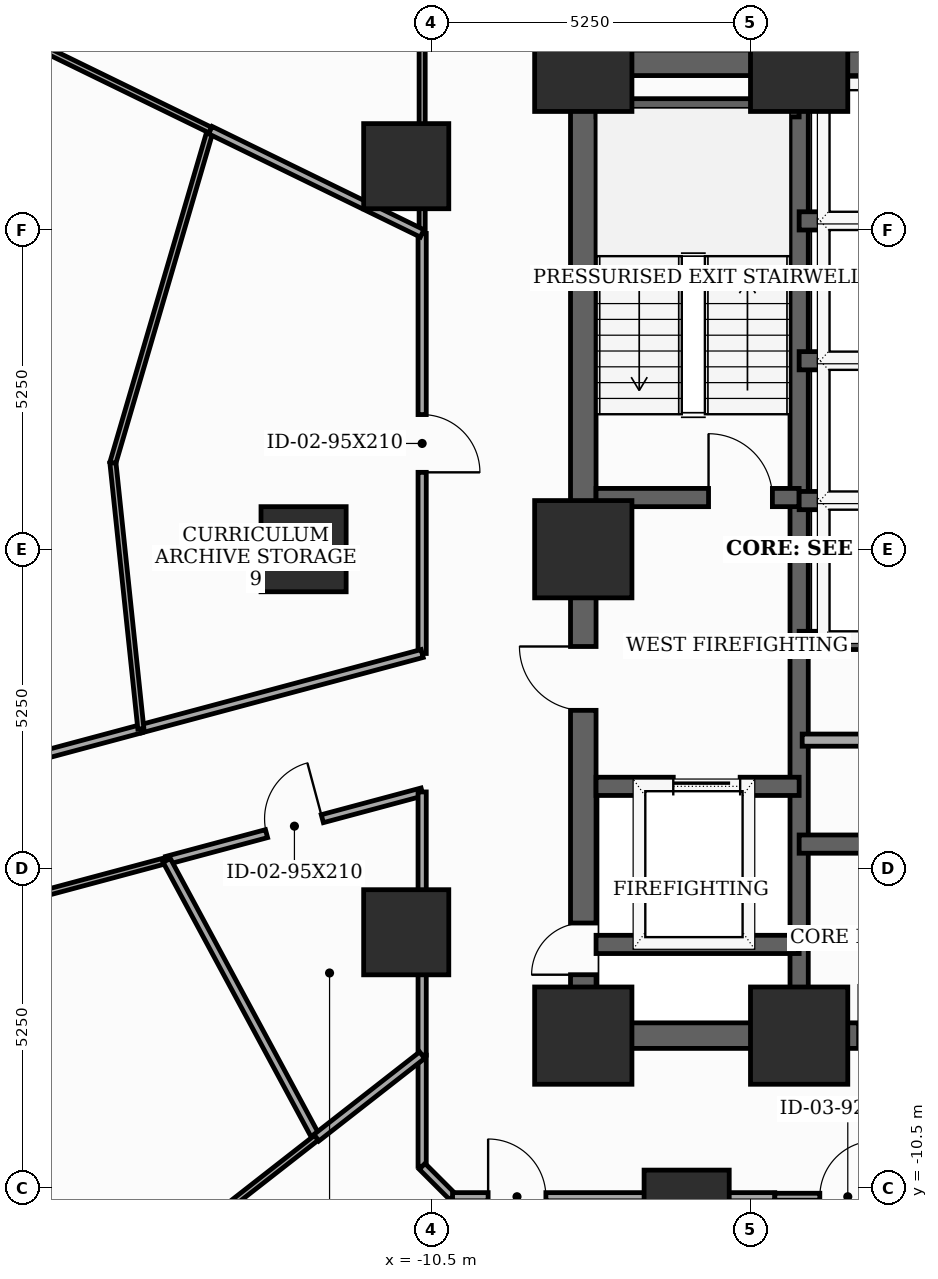
"""IFC4 building model, lengths in metres.
Left out: names, types, materials, properties, quantities, classifications, styles, units other than length and angle.
Written with IfcOpenShell. Run it as: python <this file> out.ifc"""

import sys

from ifc_helpers import new_model, si_unit, direction, frame, frame_2d, origin, origin_2d, place, context, subcontext, project, spatial, rectangle, extrude, element, fill, save


model = new_model("IFC4")
c1 = context("Model", 3, precision=1e-05, world=origin(), true_north=direction((0.0, 1.0)))
c2 = subcontext(c1, "Body", "Model", "MODEL_VIEW")
j1 = project(units=[si_unit("LENGTHUNIT", "METRE"), si_unit("PLANEANGLEUNIT", "RADIAN")], contexts=[c1])
p1 = place(None, origin())
s1 = spatial("IfcSite", under=j1, at=p1, CompositionType="ELEMENT")
p2 = place(p1, origin())
s2 = spatial("IfcBuilding", under=s1, at=p2, CompositionType="ELEMENT")
p3 = place(p2, frame((0.0, 0.0, 51.9)))
s3 = spatial("IfcBuildingStorey", under=s2, at=p3, CompositionType="ELEMENT", Elevation=51.9)
for number, where, z_axis, x_axis in (
    (1, (-8.0, -8.0, 0.0), (0.0, 0.0, 1.0), (1.0, 0.0, 0.0)),
    (2, (-4.45, -8.0, 0.0), (0.0, 0.0, 1.0), (1.0, 0.0, 0.0)),
    (3, (-4.45, 8.0, 0.0), (0.0, 0.0, 1.0), (1.0, 0.0, 0.0)),
    (4, (-8.0, 8.0, 0.0), (0.0, 0.0, 1.0), (1.0, 0.0, 0.0)),
    (5, (-8.0, 0.0, 0.0), (0.0, 0.0, 1.0), (1.0, 0.0, 0.0)),
):
    element("IfcColumn", number, at=place(p3, frame(where, z_axis=z_axis, x_axis=x_axis)), inside=s3, PredefinedType="COLUMN", context=c2, shape_type="SweptSolid", body=[
        extrude(rectangle(XDim=1.6, YDim=1.6, at=origin_2d()), origin(), (0.0, 0.0, 1.0), 3.7),
    ])
for number, where, z_axis, x_axis in (
    (6, (-10.912, 6.3, 0.0), (0.0, 0.0, 1.0), (1.0, 0.0, 0.0)),
    (7, (-12.6, 0.0, 0.0), (0.0, 0.0, 1.0), (1.0, 0.0, 0.0)),
    (8, (-10.912, -6.3, 0.0), (0.0, 0.0, 1.0), (1.0, 0.0, 0.0)),
    (9, (-6.3, -10.912, 0.0), (0.0, 0.0, 1.0), (1.0, 0.0, 0.0)),
):
    element("IfcColumn", number, at=place(p3, frame(where, z_axis=z_axis, x_axis=x_axis)), inside=s3, PredefinedType="COLUMN", context=c2, shape_type="SweptSolid", body=[
        extrude(rectangle(XDim=1.4, YDim=1.4, at=origin_2d()), origin(), (0.0, 0.0, 1.0), 3.7),
    ])
p4 = place(p3, frame((-8.0, -8.0, 0.0), z_axis=(0.0, 0.0, 1.0), x_axis=(0.0, 1.0, 0.0)))
e10 = element("IfcWall", 10, at=p4, inside=s3, PredefinedType="SHEAR", context=c2, shape_type="SweptSolid", body=[
    extrude(rectangle(XDim=16.0, YDim=0.42, at=frame_2d((8.0, 0.0))), origin(), (0.0, 0.0, 1.0), 3.5),
])
p5 = place(p4, frame((1.002, 0.0, 0.0)))
e11 = element("IfcOpeningElement", 11, at=p5, cuts=e10, PredefinedType="OPENING", context=c2, shape_type="SweptSolid", body=[
    extrude(rectangle(XDim=0.85, YDim=2.02, at=frame_2d((0.425, 1.01))), frame((0.0, 0.22, 0.0), z_axis=(0.0, -1.0, 0.0), x_axis=(1.0, 0.0, 0.0)), (0.0, 0.0, 1.0), 0.44),
])
p6 = place(p4, frame((5.35, 0.0, 0.0)))
e12 = element("IfcOpeningElement", 12, at=p6, cuts=e10, PredefinedType="OPENING", context=c2, shape_type="SweptSolid", body=[
    extrude(rectangle(XDim=1.05, YDim=2.15, at=frame_2d((0.525, 1.075))), frame((0.0, 0.22, 0.0), z_axis=(0.0, -1.0, 0.0), x_axis=(1.0, 0.0, 0.0)), (0.0, 0.0, 1.0), 0.44),
])
p7 = place(p3, frame((-8.0, -8.0, 0.0), z_axis=(0.0, 0.0, 1.0), x_axis=(1.0, 0.0, 0.0)))
e13 = element("IfcWall", 13, at=p7, inside=s3, PredefinedType="SHEAR", context=c2, shape_type="SweptSolid", body=[
    extrude(rectangle(XDim=16.0, YDim=0.42, at=frame_2d((8.0, 0.0))), origin(), (0.0, 0.0, 1.0), 3.5),
])
p8 = place(p7, frame((4.529, 0.0, 0.0)))
e14 = element("IfcOpeningElement", 14, at=p8, cuts=e13, PredefinedType="OPENING", context=c2, shape_type="SweptSolid", body=[
    extrude(rectangle(XDim=0.85, YDim=2.02, at=frame_2d((0.425, 1.01))), frame((0.0, 0.22, 0.0), z_axis=(0.0, -1.0, 0.0), x_axis=(1.0, 0.0, 0.0)), (0.0, 0.0, 1.0), 0.44),
])
p9 = place(p7, frame((6.49, 0.0, 0.0)))
e15 = element("IfcOpeningElement", 15, at=p9, cuts=e13, PredefinedType="OPENING", context=c2, shape_type="SweptSolid", body=[
    extrude(rectangle(XDim=0.85, YDim=2.02, at=frame_2d((0.425, 1.01))), frame((0.0, 0.22, 0.0), z_axis=(0.0, -1.0, 0.0), x_axis=(1.0, 0.0, 0.0)), (0.0, 0.0, 1.0), 0.44),
])
p10 = place(p7, frame((8.69, 0.0, 0.0)))
e16 = element("IfcOpeningElement", 16, at=p10, cuts=e13, PredefinedType="OPENING", context=c2, shape_type="SweptSolid", body=[
    extrude(rectangle(XDim=0.85, YDim=2.02, at=frame_2d((0.425, 1.01))), frame((0.0, 0.22, 0.0), z_axis=(0.0, -1.0, 0.0), x_axis=(1.0, 0.0, 0.0)), (0.0, 0.0, 1.0), 0.44),
])
p11 = place(p7, frame((10.621, 0.0, 0.0)))
e17 = element("IfcOpeningElement", 17, at=p11, cuts=e13, PredefinedType="OPENING", context=c2, shape_type="SweptSolid", body=[
    extrude(rectangle(XDim=0.85, YDim=2.02, at=frame_2d((0.425, 1.01))), frame((0.0, 0.22, 0.0), z_axis=(0.0, -1.0, 0.0), x_axis=(1.0, 0.0, 0.0)), (0.0, 0.0, 1.0), 0.44),
])
p12 = place(p3, frame((-8.0, 8.0, 0.0), z_axis=(0.0, 0.0, 1.0), x_axis=(1.0, 0.0, 0.0)))
e18 = element("IfcWall", 18, at=p12, inside=s3, PredefinedType="SHEAR", context=c2, shape_type="SweptSolid", body=[
    extrude(rectangle(XDim=16.0, YDim=0.42, at=frame_2d((8.0, 0.0))), origin(), (0.0, 0.0, 1.0), 3.5),
])
p13 = place(p12, frame((7.1, 0.0, 0.0)))
e19 = element("IfcOpeningElement", 19, at=p13, cuts=e18, PredefinedType="OPENING", context=c2, shape_type="SweptSolid", body=[
    extrude(rectangle(XDim=1.8, YDim=2.15, at=frame_2d((0.9, 1.075))), frame((0.0, 0.22, 0.0), z_axis=(0.0, -1.0, 0.0), x_axis=(1.0, 0.0, 0.0)), (0.0, 0.0, 1.0), 0.44),
])
p14 = place(p3, frame((-4.45, -7.79, 0.0), z_axis=(0.0, 0.0, 1.0), x_axis=(0.0, 1.0, 0.0)))
e20 = element("IfcWall", 20, at=p14, inside=s3, PredefinedType="SHEAR", context=c2, shape_type="SweptSolid", body=[
    extrude(rectangle(XDim=15.58, YDim=0.3, at=frame_2d((7.79, 0.0))), origin(), (0.0, 0.0, 1.0), 3.5),
])
p15 = place(p3, frame((-7.79, 0.85, 0.0), z_axis=(0.0, 0.0, 1.0), x_axis=(1.0, 0.0, 0.0)))
e21 = element("IfcWall", 21, at=p15, inside=s3, PredefinedType="SHEAR", context=c2, shape_type="SweptSolid", body=[
    extrude(rectangle(XDim=3.34, YDim=0.3, at=frame_2d((1.67, 0.0))), origin(), (0.0, 0.0, 1.0), 3.5),
])
p16 = place(p15, frame((1.85, 0.0, 0.0)))
e22 = element("IfcOpeningElement", 22, at=p16, cuts=e21, PredefinedType="OPENING", context=c2, shape_type="SweptSolid", body=[
    extrude(rectangle(XDim=1.05, YDim=2.15, at=frame_2d((0.525, 1.075))), frame((0.0, 0.16, 0.0), z_axis=(0.0, -1.0, 0.0), x_axis=(1.0, 0.0, 0.0)), (0.0, 0.0, 1.0), 0.32),
])
p17 = place(p3, frame((-7.79, 7.26, 0.0), z_axis=(0.0, 0.0, 1.0), x_axis=(1.0, 0.0, 0.0)))
e23 = element("IfcWall", 23, at=p17, inside=s3, PredefinedType="SHEAR", context=c2, shape_type="SweptSolid", body=[
    extrude(rectangle(XDim=3.34, YDim=0.3, at=frame_2d((1.67, 0.0))), origin(), (0.0, 0.0, 1.0), 3.5),
])
p18 = place(p3, frame((-7.79, -3.9, 0.0), z_axis=(0.0, 0.0, 1.0), x_axis=(1.0, 0.0, 0.0)))
e24 = element("IfcWall", 24, at=p18, inside=s3, PredefinedType="SHEAR", context=c2, shape_type="SweptSolid", body=[
    extrude(rectangle(XDim=3.34, YDim=0.3, at=frame_2d((1.67, 0.0))), origin(), (0.0, 0.0, 1.0), 3.5),
])
p19 = place(p18, frame((1.27, 0.0, 0.0)))
e25 = element("IfcOpeningElement", 25, at=p19, cuts=e24, PredefinedType="OPENING", context=c2, shape_type="SweptSolid", body=[
    extrude(rectangle(XDim=1.1, YDim=2.1, at=frame_2d((0.55, 1.05))), frame((0.0, 0.16, 0.0), z_axis=(0.0, -1.0, 0.0), x_axis=(1.0, 0.0, 0.0)), (0.0, 0.0, 1.0), 0.32),
])
p20 = place(p3, frame((-7.79, -6.5, 0.0), z_axis=(0.0, 0.0, 1.0), x_axis=(1.0, 0.0, 0.0)))
e26 = element("IfcWall", 26, at=p20, inside=s3, PredefinedType="SHEAR", context=c2, shape_type="SweptSolid", body=[
    extrude(rectangle(XDim=3.34, YDim=0.3, at=frame_2d((1.67, 0.0))), origin(), (0.0, 0.0, 1.0), 3.5),
])
p21 = place(p3, frame((-4.45, -4.85, 0.0), z_axis=(0.0, 0.0, 1.0), x_axis=(1.0, 0.0, 0.0)))
e27 = element("IfcWall", 27, at=p21, inside=s3, PredefinedType="SHEAR", context=c2, shape_type="SweptSolid", body=[
    extrude(rectangle(XDim=8.9, YDim=0.3, at=frame_2d((4.45, 0.0))), origin(), (0.0, 0.0, 1.0), 3.5),
])
for number, where, z_axis, x_axis in (
    (28, (-4.45, -1.5, 0.0), (0.0, 0.0, 1.0), (1.0, 0.0, 0.0)),
    (29, (-4.45, 0.8, 0.0), (0.0, 0.0, 1.0), (1.0, 0.0, 0.0)),
    (30, (-4.45, 3.1, 0.0), (0.0, 0.0, 1.0), (1.0, 0.0, 0.0)),
    (31, (-4.45, 5.4, 0.0), (0.0, 0.0, 1.0), (1.0, 0.0, 0.0)),
):
    element("IfcWall", number, at=place(p3, frame(where, z_axis=z_axis, x_axis=x_axis)), inside=s3, PredefinedType="SHEAR", context=c2, shape_type="SweptSolid", body=[
        extrude(rectangle(XDim=2.77, YDim=0.3, at=frame_2d((1.385, 0.0))), origin(), (0.0, 0.0, 1.0), 3.5),
    ])
p22 = place(p3, frame((-4.4, -3.14, 0.0), z_axis=(0.0, 0.0, 1.0), x_axis=(1.0, 0.0, 0.0)))
e32 = element("IfcWall", 32, at=p22, inside=s3, PredefinedType="SOLIDWALL", context=c2, shape_type="SweptSolid", body=[
    extrude(rectangle(XDim=2.68, YDim=0.2, at=frame_2d((1.34, 0.0))), origin(), (0.0, 0.0, 1.0), 3.5),
])
p23 = place(p3, frame((-14.851, -5.118, 0.0), z_axis=(0.0, 0.0, 1.0), x_axis=(0.965909963178, 0.258878239783, 0.0)))
e33 = element("IfcWall", 33, at=p23, inside=s3, PredefinedType="PARTITIONING", context=c2, shape_type="SweptSolid", body=[
    extrude(rectangle(XDim=4.349, YDim=0.135, at=frame_2d((2.175, 0.0))), origin(), (0.0, 0.0, 1.0), 2.785),
])
p24 = place(p23, frame((1.7, 0.0, 0.0)))
e34 = element("IfcOpeningElement", 34, at=p24, cuts=e33, PredefinedType="OPENING", context=c2, shape_type="SweptSolid", body=[
    extrude(rectangle(XDim=0.95, YDim=2.1, at=frame_2d((0.475, 1.05))), frame((0.0, 0.077, 0.0), z_axis=(0.0, -1.0, 0.0), x_axis=(1.0, 0.0, 0.0)), (0.0, 0.0, 1.0), 0.155),
])
p25 = place(p3, frame((-10.65, -3.992, 0.0), z_axis=(0.0, 0.0, 1.0), x_axis=(0.0, -1.0, 0.0)))
e35 = element("IfcWall", 35, at=p25, inside=s3, PredefinedType="PARTITIONING", context=c2, shape_type="SweptSolid", body=[
    extrude(rectangle(XDim=4.329, YDim=0.135, at=frame_2d((2.165, 0.0))), origin(), (0.0, 0.0, 1.0), 2.785),
])
p26 = place(p3, frame((-15.276, -2.954, 0.0), z_axis=(0.0, 0.0, 1.0), x_axis=(-0.965909107385, -0.258881432844, 0.0)))
e36 = element("IfcWall", 36, at=p26, inside=s3, PredefinedType="PARTITIONING", context=c2, shape_type="SweptSolid", body=[
    extrude(rectangle(XDim=7.081, YDim=0.135, at=frame_2d((3.54, 0.0))), origin(), (0.0, 0.0, 1.0), 2.085),
])
p27 = place(p26, frame((2.74, 0.0, 0.0)))
e37 = element("IfcOpeningElement", 37, at=p27, cuts=e36, PredefinedType="OPENING", context=c2, shape_type="SweptSolid", body=[
    extrude(rectangle(XDim=1.6, YDim=2.035, at=frame_2d((0.8, 1.018))), frame((0.0, 0.077, 0.0), z_axis=(0.0, -1.0, 0.0), x_axis=(1.0, 0.0, 0.0)), (0.0, 0.0, 1.0), 0.155),
])
p28 = place(p3, frame((-21.545, -6.912, 0.0), z_axis=(0.0, 0.0, 1.0), x_axis=(0.965904958487, 0.258896912245, 0.0)))
e38 = element("IfcWall", 38, at=p28, inside=s3, PredefinedType="MOVABLE", context=c2, shape_type="SweptSolid", body=[
    extrude(rectangle(XDim=6.93, YDim=0.1, at=frame_2d((3.465, 0.0))), origin(), (0.0, 0.0, 1.0), 2.085),
])
p29 = place(p3, frame((-10.65, 5.194, 0.0), z_axis=(0.0, 0.0, 1.0), x_axis=(0.0, -1.0, 0.0)))
e39 = element("IfcWall", 39, at=p29, inside=s3, PredefinedType="PARTITIONING", context=c2, shape_type="SweptSolid", body=[
    extrude(rectangle(XDim=6.909, YDim=0.135, at=frame_2d((3.455, 0.0))), origin(), (0.0, 0.0, 1.0), 2.785),
])
p30 = place(p29, frame((2.979, 0.0, 0.0)))
e40 = element("IfcOpeningElement", 40, at=p30, cuts=e39, PredefinedType="OPENING", context=c2, shape_type="SweptSolid", body=[
    extrude(rectangle(XDim=0.95, YDim=2.1, at=frame_2d((0.475, 1.05))), frame((0.0, 0.077, 0.0), z_axis=(0.0, -1.0, 0.0), x_axis=(1.0, 0.0, 0.0)), (0.0, 0.0, 1.0), 0.155),
])
p31 = place(p3, frame((-10.65, -1.715, 0.0), z_axis=(0.0, 0.0, 1.0), x_axis=(-0.965952601708, -0.258719097196, 0.0)))
e41 = element("IfcWall", 41, at=p31, inside=s3, PredefinedType="PARTITIONING", context=c2, shape_type="SweptSolid", body=[
    extrude(rectangle(XDim=4.789, YDim=0.135, at=frame_2d((2.395, 0.0))), origin(), (0.0, 0.0, 1.0), 2.785),
])
p32 = place(p3, frame((-10.65, -8.321, 0.0), z_axis=(0.0, 0.0, 1.0), x_axis=(0.0, -1.0, 0.0)))
e42 = element("IfcWall", 42, at=p32, inside=s3, PredefinedType="PARTITIONING", context=c2, shape_type="SweptSolid", body=[
    extrude(rectangle(XDim=1.829, YDim=0.135, at=frame_2d((0.915, 0.0))), origin(), (0.0, 0.0, 1.0), 3.5),
])
p33 = place(p3, frame((-10.65, -10.15, 0.0), z_axis=(0.0, 0.0, 1.0), x_axis=(0.707106781187, -0.707106781187, 0.0)))
e43 = element("IfcWall", 43, at=p33, inside=s3, PredefinedType="PARTITIONING", context=c2, shape_type="SweptSolid", body=[
    extrude(rectangle(XDim=0.707, YDim=0.135, at=frame_2d((0.354, 0.0))), origin(), (0.0, 0.0, 1.0), 3.5),
])
p34 = place(p3, frame((-10.15, -10.65, 0.0), z_axis=(0.0, 0.0, 1.0), x_axis=(1.0, 0.0, 0.0)))
e44 = element("IfcWall", 44, at=p34, inside=s3, PredefinedType="PARTITIONING", context=c2, shape_type="SweptSolid", body=[
    extrude(rectangle(XDim=5.3, YDim=0.135, at=frame_2d((2.65, 0.0))), origin(), (0.0, 0.0, 1.0), 2.085),
])
p35 = place(p34, frame((0.585, 0.0, 0.0)))
e45 = element("IfcOpeningElement", 45, at=p35, cuts=e44, PredefinedType="OPENING", context=c2, shape_type="SweptSolid", body=[
    extrude(rectangle(XDim=0.95, YDim=2.035, at=frame_2d((0.475, 1.018))), frame((0.0, 0.077, 0.0), z_axis=(0.0, -1.0, 0.0), x_axis=(1.0, 0.0, 0.0)), (0.0, 0.0, 1.0), 0.155),
])
p36 = place(p3, frame((-4.85, -10.65, 0.0), z_axis=(0.0, 0.0, 1.0), x_axis=(1.0, 0.0, 0.0)))
e46 = element("IfcWall", 46, at=p36, inside=s3, PredefinedType="PARTITIONING", context=c2, shape_type="SweptSolid", body=[
    extrude(rectangle(XDim=2.4, YDim=0.115, at=frame_2d((1.2, 0.0))), origin(), (0.0, 0.0, 1.0), 3.5),
])
p37 = place(p36, frame((0.74, 0.0, 0.0)))
e47 = element("IfcOpeningElement", 47, at=p37, cuts=e46, PredefinedType="OPENING", context=c2, shape_type="SweptSolid", body=[
    extrude(rectangle(XDim=0.92, YDim=2.1, at=frame_2d((0.46, 1.05))), frame((0.0, 0.067, 0.0), z_axis=(0.0, -1.0, 0.0), x_axis=(1.0, 0.0, 0.0)), (0.0, 0.0, 1.0), 0.135),
])
p38 = place(p3, frame((-10.65, 10.15, 0.0), z_axis=(0.0, 0.0, 1.0), x_axis=(0.0, -1.0, 0.0)))
e48 = element("IfcWall", 48, at=p38, inside=s3, PredefinedType="MOVABLE", context=c2, shape_type="SweptSolid", body=[
    extrude(rectangle(XDim=4.956, YDim=0.1, at=frame_2d((2.478, 0.0))), origin(), (0.0, 0.0, 1.0), 2.085),
])
p39 = place(p38, frame((0.531, 0.0, 0.0)))
e49 = element("IfcOpeningElement", 49, at=p39, cuts=e48, PredefinedType="OPENING", context=c2, shape_type="SweptSolid", body=[
    extrude(rectangle(XDim=0.92, YDim=2.035, at=frame_2d((0.46, 1.018))), frame((0.0, 0.06, 0.0), z_axis=(0.0, -1.0, 0.0), x_axis=(1.0, 0.0, 0.0)), (0.0, 0.0, 1.0), 0.12),
])
p40 = place(p3, frame((-14.851, -5.118, 0.0), z_axis=(0.0, 0.0, 1.0), x_axis=(0.474543506137, -0.880232049395, 0.0)))
e50 = element("IfcWall", 50, at=p40, inside=s3, PredefinedType="PARTITIONING", context=c2, shape_type="SweptSolid", body=[
    extrude(rectangle(XDim=5.184, YDim=0.135, at=frame_2d((2.592, 0.0))), origin(), (0.0, 0.0, 1.0), 2.085),
])
p41 = place(p3, frame((-12.391, -9.681, 0.0), z_axis=(0.0, 0.0, 1.0), x_axis=(0.788124883644, 0.615515367624, 0.0)))
e51 = element("IfcWall", 51, at=p41, inside=s3, PredefinedType="PARTITIONING", context=c2, shape_type="SweptSolid", body=[
    extrude(rectangle(XDim=2.209, YDim=0.135, at=frame_2d((1.104, 0.0))), origin(), (0.0, 0.0, 1.0), 3.5),
])
p42 = place(p3, frame((-15.276, -2.954, 0.0), z_axis=(0.0, 0.0, 1.0), x_axis=(-0.104560622475, 0.994518514774, 0.0)))
e52 = element("IfcWall", 52, at=p42, inside=s3, PredefinedType="MOVABLE", context=c2, shape_type="SweptSolid", body=[
    extrude(rectangle(XDim=4.401, YDim=0.1, at=frame_2d((2.201, 0.0))), origin(), (0.0, 0.0, 1.0), 2.085),
])
p43 = place(p3, frame((-15.736, 1.423, 0.0), z_axis=(0.0, 0.0, 1.0), x_axis=(0.281231672123, 0.959639904649, 0.0)))
e53 = element("IfcWall", 53, at=p43, inside=s3, PredefinedType="MOVABLE", context=c2, shape_type="SweptSolid", body=[
    extrude(rectangle(XDim=5.7, YDim=0.1, at=frame_2d((2.85, 0.0))), origin(), (0.0, 0.0, 1.0), 2.085),
])
p44 = place(p3, frame((-24.11, -18.837, 0.0), z_axis=(0.0, 0.0, 1.0), x_axis=(0.788000479848, 0.615674624911, 0.0)))
e54 = element("IfcWall", 54, at=p44, inside=s3, PredefinedType="MOVABLE", context=c2, shape_type="SweptSolid", body=[
    extrude(rectangle(XDim=14.872, YDim=0.1, at=frame_2d((7.436, 0.0))), origin(), (0.0, 0.0, 1.0), 2.085),
])
p45 = place(p3, frame((-14.133, 6.893, 0.0), z_axis=(0.0, 0.0, 1.0), x_axis=(-0.898789989557, 0.438379464245, 0.0)))
e55 = element("IfcWall", 55, at=p45, inside=s3, PredefinedType="MOVABLE", context=c2, shape_type="SweptSolid", body=[
    extrude(rectangle(XDim=3.158, YDim=0.1, at=frame_2d((1.579, 0.0))), origin(), (0.0, 0.0, 1.0), 2.085),
])
p46 = place(p3, frame((-10.65, 5.194, 0.0), z_axis=(0.0, 0.0, 1.0), x_axis=(-0.898781159743, 0.438397567159, 0.0)))
e56 = element("IfcWall", 56, at=p46, inside=s3, PredefinedType="PARTITIONING", context=c2, shape_type="SweptSolid", body=[
    extrude(rectangle(XDim=3.875, YDim=0.135, at=frame_2d((1.938, 0.0))), origin(), (0.0, 0.0, 1.0), 2.785),
])
p47 = place(p5, origin())
e57 = element("IfcDoor", 57, at=p47, inside=s3, OperationType="SINGLE_SWING_LEFT", PredefinedType="TRAPDOOR", context=c2, shape_type="SweptSolid", body=[
    extrude(rectangle(XDim=0.85, YDim=2.02, at=frame_2d((0.425, 1.01))), frame((0.0, 0.025, 0.0), z_axis=(0.0, -1.0, 0.0), x_axis=(1.0, 0.0, 0.0)), (0.0, 0.0, 1.0), 0.05),
])
fill(e11, e57)
p48 = place(p6, origin())
e58 = element("IfcDoor", 58, at=p48, inside=s3, OperationType="SINGLE_SWING_RIGHT", PredefinedType="DOOR", context=c2, shape_type="SweptSolid", body=[
    extrude(rectangle(XDim=1.05, YDim=2.15, at=frame_2d((0.525, 1.075))), frame((0.0, 0.025, 0.0), z_axis=(0.0, -1.0, 0.0), x_axis=(1.0, 0.0, 0.0)), (0.0, 0.0, 1.0), 0.05),
])
fill(e12, e58)
p49 = place(p16, origin())
e59 = element("IfcDoor", 59, at=p49, inside=s3, OperationType="SINGLE_SWING_LEFT", PredefinedType="DOOR", context=c2, shape_type="SweptSolid", body=[
    extrude(rectangle(XDim=1.05, YDim=2.15, at=frame_2d((0.525, 1.075))), frame((0.0, 0.025, 0.0), z_axis=(0.0, -1.0, 0.0), x_axis=(1.0, 0.0, 0.0)), (0.0, 0.0, 1.0), 0.05),
])
fill(e22, e59)
p50 = place(p19, origin())
e60 = element("IfcDoor", 60, at=p50, inside=s3, OperationType="SLIDING_TO_LEFT", PredefinedType="DOOR", context=c2, shape_type="SweptSolid", body=[
    extrude(rectangle(XDim=1.1, YDim=2.1, at=frame_2d((0.55, 1.05))), frame((0.0, 0.025, 0.0), z_axis=(0.0, -1.0, 0.0), x_axis=(1.0, 0.0, 0.0)), (0.0, 0.0, 1.0), 0.05),
])
fill(e25, e60)
p51 = place(p24, origin())
e61 = element("IfcDoor", 61, at=p51, inside=s3, OperationType="SINGLE_SWING_RIGHT", PredefinedType="DOOR", context=c2, shape_type="SweptSolid", body=[
    extrude(rectangle(XDim=0.95, YDim=2.1, at=frame_2d((0.475, 1.05))), frame((0.0, 0.025, 0.0), z_axis=(0.0, -1.0, 0.0), x_axis=(1.0, 0.0, 0.0)), (0.0, 0.0, 1.0), 0.05),
])
fill(e34, e61)
p52 = place(p30, origin())
e62 = element("IfcDoor", 62, at=p52, inside=s3, OperationType="SINGLE_SWING_RIGHT", PredefinedType="DOOR", context=c2, shape_type="SweptSolid", body=[
    extrude(rectangle(XDim=0.95, YDim=2.1, at=frame_2d((0.475, 1.05))), frame((0.0, 0.025, 0.0), z_axis=(0.0, -1.0, 0.0), x_axis=(1.0, 0.0, 0.0)), (0.0, 0.0, 1.0), 0.05),
])
fill(e40, e62)
p53 = place(p35, origin())
e63 = element("IfcDoor", 63, at=p53, inside=s3, OperationType="SINGLE_SWING_LEFT", PredefinedType="DOOR", context=c2, shape_type="SweptSolid", body=[
    extrude(rectangle(XDim=0.95, YDim=2.035, at=frame_2d((0.475, 1.018))), frame((0.0, 0.025, 0.0), z_axis=(0.0, -1.0, 0.0), x_axis=(1.0, 0.0, 0.0)), (0.0, 0.0, 1.0), 0.05),
])
fill(e45, e63)
p54 = place(p37, origin())
e64 = element("IfcDoor", 64, at=p54, inside=s3, OperationType="SINGLE_SWING_RIGHT", PredefinedType="DOOR", context=c2, shape_type="SweptSolid", body=[
    extrude(rectangle(XDim=0.92, YDim=2.1, at=frame_2d((0.46, 1.05))), frame((0.0, 0.025, 0.0), z_axis=(0.0, -1.0, 0.0), x_axis=(1.0, 0.0, 0.0)), (0.0, 0.0, 1.0), 0.05),
])
fill(e47, e64)
save(model, sys.argv[1])
